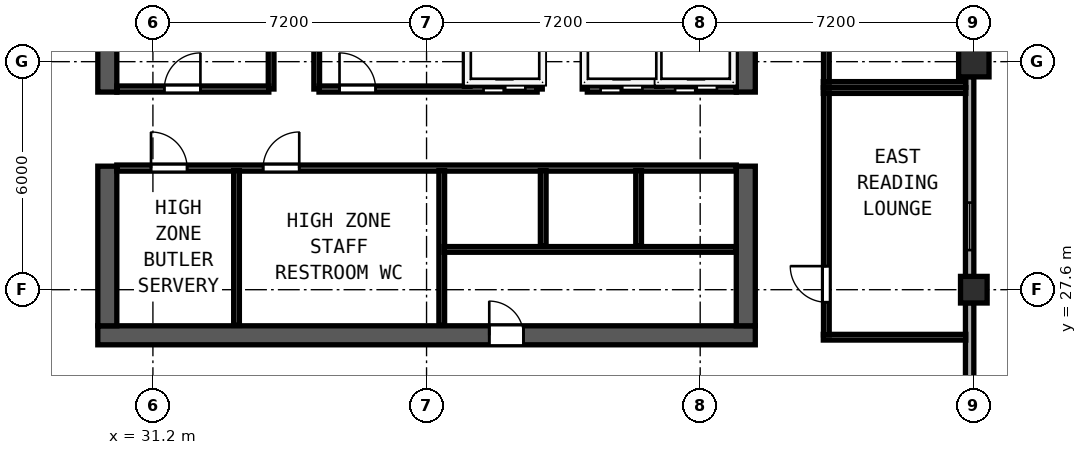
"""IFC4 building model, lengths in metres.
Left out: names, types, materials, properties, quantities, classifications, styles, units other than length and angle.
Written with IfcOpenShell. Run it as: python <this file> out.ifc"""

import sys

from ifc_helpers import new_model, si_unit, direction, frame, frame_2d, origin, origin_2d, place, context, subcontext, project, spatial, rectangle, hollow_rectangle, extrude, element, fill, save


model = new_model("IFC4")
c1 = context("Model", 3, precision=1e-05, world=origin(), true_north=direction((0.0, 1.0)))
c2 = subcontext(c1, "Body", "Model", "MODEL_VIEW")
j1 = project(units=[si_unit("LENGTHUNIT", "METRE"), si_unit("PLANEANGLEUNIT", "RADIAN")], contexts=[c1])
p1 = place(None, origin())
s1 = spatial("IfcSite", under=j1, at=p1, CompositionType="ELEMENT")
p2 = place(p1, origin())
s2 = spatial("IfcBuilding", under=s1, at=p2, CompositionType="ELEMENT")
p3 = place(p2, frame((0.0, 0.0, 246.75)))
s3 = spatial("IfcBuildingStorey", under=s2, at=p3, CompositionType="ELEMENT", Elevation=246.75)
p4 = place(p3, frame((29.75, 26.4, 0.0), z_axis=(0.0, 0.0, 1.0), x_axis=(1.0, 0.0, 0.0)))
e1 = element("IfcWall", 1, at=p4, inside=s3, PredefinedType="SHEAR", context=c2, shape_type="SweptSolid", body=[
    extrude(rectangle(XDim=17.3, YDim=0.5, at=frame_2d((8.65, 0.0))), origin(), (0.0, 0.0, 1.0), 3.67),
])
p5 = place(p4, frame((11.2, 0.0, 0.0), z_axis=(0.0, 0.0, 1.0), x_axis=(-1.0, 0.0, 0.0)))
e2 = element("IfcOpeningElement", 2, at=p5, cuts=e1, PredefinedType="OPENING", context=c2, shape_type="SweptSolid", body=[
    extrude(rectangle(XDim=0.9, YDim=2.1, at=frame_2d((0.45, 1.05))), frame((0.0, 0.26, 0.0), z_axis=(0.0, -1.0, 0.0), x_axis=(1.0, 0.0, 0.0)), (0.0, 0.0, 1.0), 0.52),
])
p6 = place(p3, frame((30.0, 26.65, 0.0), z_axis=(0.0, 0.0, 1.0), x_axis=(0.0, 1.0, 0.0)))
e3 = element("IfcWall", 3, at=p6, inside=s3, PredefinedType="SHEAR", context=c2, shape_type="SweptSolid", body=[
    extrude(rectangle(XDim=4.2, YDim=0.5, at=frame_2d((2.1, 0.0))), origin(), (0.0, 0.0, 1.0), 3.67),
])
p7 = place(p3, frame((30.0, 32.8, 0.0), z_axis=(0.0, 0.0, 1.0), x_axis=(0.0, 1.0, 0.0)))
e4 = element("IfcWall", 4, at=p7, inside=s3, PredefinedType="SHEAR", context=c2, shape_type="SweptSolid", body=[
    extrude(rectangle(XDim=10.15, YDim=0.5, at=frame_2d((5.075, 0.0))), origin(), (0.0, 0.0, 1.0), 3.67),
])
p8 = place(p3, frame((46.8, 26.65, 0.0), z_axis=(0.0, 0.0, 1.0), x_axis=(0.0, 1.0, 0.0)))
e5 = element("IfcWall", 5, at=p8, inside=s3, PredefinedType="SHEAR", context=c2, shape_type="SweptSolid", body=[
    extrude(rectangle(XDim=4.2, YDim=0.5, at=frame_2d((2.1, 0.0))), origin(), (0.0, 0.0, 1.0), 3.67),
])
p9 = place(p3, frame((46.8, 32.8, 0.0), z_axis=(0.0, 0.0, 1.0), x_axis=(0.0, 1.0, 0.0)))
e6 = element("IfcWall", 6, at=p9, inside=s3, PredefinedType="SHEAR", context=c2, shape_type="SweptSolid", body=[
    extrude(rectangle(XDim=10.15, YDim=0.5, at=frame_2d((5.075, 0.0))), origin(), (0.0, 0.0, 1.0), 3.67),
])
p10 = place(p3, frame((52.8, 33.6, 0.0), z_axis=(0.0, 0.0, 1.0), x_axis=(1.0, 0.0, 0.0)))
e7 = element("IfcColumn", 7, at=p10, inside=s3, PredefinedType="COLUMN", context=c2, shape_type="SweptSolid", body=[
    extrude(hollow_rectangle(XDim=0.8, YDim=0.8, WallThickness=0.03, at=origin_2d()), origin(), (0.0, 0.0, 1.0), 3.85),
])
p11 = place(p3, frame((52.8, 27.6, 0.0), z_axis=(0.0, 0.0, 1.0), x_axis=(1.0, 0.0, 0.0)))
e8 = element("IfcColumn", 8, at=p11, inside=s3, PredefinedType="COLUMN", context=c2, shape_type="SweptSolid", body=[
    extrude(hollow_rectangle(XDim=0.7, YDim=0.7, WallThickness=0.026, at=origin_2d()), origin(), (0.0, 0.0, 1.0), 3.85),
])
p12 = place(p3, frame((52.69, 21.992, 0.0), z_axis=(0.0, 0.0, 1.0), x_axis=(0.0, 1.0, 0.0)))
e9 = element("IfcWall", 9, at=p12, inside=s3, PredefinedType="SOLIDWALL", context=c2, shape_type="SweptSolid", body=[
    extrude(rectangle(XDim=5.266, YDim=0.22, at=frame_2d((2.633, 0.0))), origin(), (0.0, 0.0, 1.0), 3.315),
])
p13 = place(p12, frame((0.7, 0.0, 0.85)))
e10 = element("IfcOpeningElement", 10, at=p13, cuts=e9, PredefinedType="OPENING", context=c2, shape_type="SweptSolid", body=[
    extrude(rectangle(XDim=1.25, YDim=1.95, at=frame_2d((0.625, 0.975))), frame((0.0, 0.12, 0.0), z_axis=(0.0, -1.0, 0.0), x_axis=(1.0, 0.0, 0.0)), (0.0, 0.0, 1.0), 0.24),
])
p14 = place(p3, frame((52.69, 27.942, 0.0), z_axis=(0.0, 0.0, 1.0), x_axis=(0.0, 1.0, 0.0)))
e11 = element("IfcWall", 11, at=p14, inside=s3, PredefinedType="SOLIDWALL", context=c2, shape_type="SweptSolid", body=[
    extrude(rectangle(XDim=5.266, YDim=0.22, at=frame_2d((2.633, 0.0))), origin(), (0.0, 0.0, 1.0), 3.315),
])
p15 = place(p14, frame((0.7, 0.0, 0.85)))
e12 = element("IfcOpeningElement", 12, at=p15, cuts=e11, PredefinedType="OPENING", context=c2, shape_type="SweptSolid", body=[
    extrude(rectangle(XDim=1.25, YDim=1.95, at=frame_2d((0.625, 0.975))), frame((0.0, 0.12, 0.0), z_axis=(0.0, -1.0, 0.0), x_axis=(1.0, 0.0, 0.0)), (0.0, 0.0, 1.0), 0.24),
])
for number, where, z_axis, x_axis in (
    (13, (34.31, 32.88, 0.0), (0.0, 0.0, 1.0), (0.0, 1.0, 0.0)),
    (14, (35.51, 32.88, 0.0), (0.0, 0.0, 1.0), (0.0, 1.0, 0.0)),
    (15, (41.37, 32.88, 0.0), (0.0, 0.0, 1.0), (0.0, 1.0, 0.0)),
    (16, (42.57, 32.88, 0.0), (0.0, 0.0, 1.0), (0.0, 1.0, 0.0)),
):
    element("IfcWall", number, at=place(p3, frame(where, z_axis=z_axis, x_axis=x_axis)), inside=s3, PredefinedType="SOLIDWALL", context=c2, shape_type="SweptSolid", body=[
        extrude(rectangle(XDim=2.17, YDim=0.15, at=frame_2d((1.085, 0.0))), origin(), (0.0, 0.0, 1.0), 3.67),
    ])
p16 = place(p3, frame((30.25, 32.88, 0.0), z_axis=(0.0, 0.0, 1.0), x_axis=(1.0, 0.0, 0.0)))
e17 = element("IfcWall", 17, at=p16, inside=s3, PredefinedType="SOLIDWALL", context=c2, shape_type="SweptSolid", body=[
    extrude(rectangle(XDim=4.0, YDim=0.16, at=frame_2d((2.0, 0.0))), origin(), (0.0, 0.0, 1.0), 3.67),
])
p17 = place(p16, frame((2.2, 0.0, 0.0), z_axis=(0.0, 0.0, 1.0), x_axis=(-1.0, 0.0, 0.0)))
e18 = element("IfcOpeningElement", 18, at=p17, cuts=e17, PredefinedType="OPENING", context=c2, shape_type="SweptSolid", body=[
    extrude(rectangle(XDim=0.95, YDim=2.12, at=frame_2d((0.475, 1.06))), frame((0.0, 0.09, 0.0), z_axis=(0.0, -1.0, 0.0), x_axis=(1.0, 0.0, 0.0)), (0.0, 0.0, 1.0), 0.18),
])
p18 = place(p3, frame((35.57, 32.88, 0.0), z_axis=(0.0, 0.0, 1.0), x_axis=(1.0, 0.0, 0.0)))
e19 = element("IfcWall", 19, at=p18, inside=s3, PredefinedType="SOLIDWALL", context=c2, shape_type="SweptSolid", body=[
    extrude(rectangle(XDim=5.74, YDim=0.16, at=frame_2d((2.87, 0.0))), origin(), (0.0, 0.0, 1.0), 3.67),
])
p19 = place(p18, frame((1.49, 0.0, 0.0), z_axis=(0.0, 0.0, 1.0), x_axis=(-1.0, 0.0, 0.0)))
e20 = element("IfcOpeningElement", 20, at=p19, cuts=e19, PredefinedType="OPENING", context=c2, shape_type="SweptSolid", body=[
    extrude(rectangle(XDim=0.95, YDim=2.12, at=frame_2d((0.475, 1.06))), frame((0.0, 0.09, 0.0), z_axis=(0.0, -1.0, 0.0), x_axis=(1.0, 0.0, 0.0)), (0.0, 0.0, 1.0), 0.18),
])
p20 = place(p18, frame((5.43, 0.0, 0.0), z_axis=(0.0, 0.0, 1.0), x_axis=(-1.0, 0.0, 0.0)))
e21 = element("IfcOpeningElement", 21, at=p20, cuts=e19, PredefinedType="OPENING", context=c2, shape_type="SweptSolid", body=[
    extrude(rectangle(XDim=1.1, YDim=2.2, at=frame_2d((0.55, 1.1))), frame((0.0, 0.09, 0.0), z_axis=(0.0, -1.0, 0.0), x_axis=(1.0, 0.0, 0.0)), (0.0, 0.0, 1.0), 0.18),
])
p21 = place(p3, frame((42.63, 32.88, 0.0), z_axis=(0.0, 0.0, 1.0), x_axis=(1.0, 0.0, 0.0)))
e22 = element("IfcWall", 22, at=p21, inside=s3, PredefinedType="SOLIDWALL", context=c2, shape_type="SweptSolid", body=[
    extrude(rectangle(XDim=3.92, YDim=0.16, at=frame_2d((1.96, 0.0))), origin(), (0.0, 0.0, 1.0), 3.67),
])
p22 = place(p21, frame((1.45, 0.0, 0.0), z_axis=(0.0, 0.0, 1.0), x_axis=(-1.0, 0.0, 0.0)))
e23 = element("IfcOpeningElement", 23, at=p22, cuts=e22, PredefinedType="OPENING", context=c2, shape_type="SweptSolid", body=[
    extrude(rectangle(XDim=1.1, YDim=2.2, at=frame_2d((0.55, 1.1))), frame((0.0, 0.09, 0.0), z_axis=(0.0, -1.0, 0.0), x_axis=(1.0, 0.0, 0.0)), (0.0, 0.0, 1.0), 0.18),
])
p23 = place(p21, frame((3.41, 0.0, 0.0), z_axis=(0.0, 0.0, 1.0), x_axis=(-1.0, 0.0, 0.0)))
e24 = element("IfcOpeningElement", 24, at=p23, cuts=e22, PredefinedType="OPENING", context=c2, shape_type="SweptSolid", body=[
    extrude(rectangle(XDim=1.1, YDim=2.2, at=frame_2d((0.55, 1.1))), frame((0.0, 0.09, 0.0), z_axis=(0.0, -1.0, 0.0), x_axis=(1.0, 0.0, 0.0)), (0.0, 0.0, 1.0), 0.18),
])
for number, where, z_axis, x_axis in (
    (25, (39.47, 32.95, 0.0), (0.0, 0.0, 1.0), (0.0, 1.0, 0.0)),
    (26, (44.53, 32.95, 0.0), (0.0, 0.0, 1.0), (0.0, 1.0, 0.0)),
):
    element("IfcWall", number, at=place(p3, frame(where, z_axis=z_axis, x_axis=x_axis)), inside=s3, PredefinedType="SOLIDWALL", context=c2, shape_type="SweptSolid", body=[
        extrude(rectangle(XDim=2.05, YDim=0.15, at=frame_2d((1.025, 0.0))), origin(), (0.0, 0.0, 1.0), 3.67),
    ])
p24 = place(p3, frame((30.25, 30.8, 0.0), z_axis=(0.0, 0.0, 1.0), x_axis=(1.0, 0.0, 0.0)))
e27 = element("IfcWall", 27, at=p24, inside=s3, PredefinedType="SOLIDWALL", context=c2, shape_type="SweptSolid", body=[
    extrude(rectangle(XDim=16.3, YDim=0.16, at=frame_2d((8.15, 0.0))), origin(), (0.0, 0.0, 1.0), 3.67),
])
p25 = place(p24, frame((0.9, 0.0, 0.0)))
e28 = element("IfcOpeningElement", 28, at=p25, cuts=e27, PredefinedType="OPENING", context=c2, shape_type="SweptSolid", body=[
    extrude(rectangle(XDim=0.95, YDim=2.12, at=frame_2d((0.475, 1.06))), frame((0.0, 0.09, 0.0), z_axis=(0.0, -1.0, 0.0), x_axis=(1.0, 0.0, 0.0)), (0.0, 0.0, 1.0), 0.18),
])
p26 = place(p24, frame((3.85, 0.0, 0.0)))
e29 = element("IfcOpeningElement", 29, at=p26, cuts=e27, PredefinedType="OPENING", context=c2, shape_type="SweptSolid", body=[
    extrude(rectangle(XDim=0.95, YDim=2.12, at=frame_2d((0.475, 1.06))), frame((0.0, 0.09, 0.0), z_axis=(0.0, -1.0, 0.0), x_axis=(1.0, 0.0, 0.0)), (0.0, 0.0, 1.0), 0.18),
])
p27 = place(p3, frame((38.8, 26.66, 0.0), z_axis=(0.0, 0.0, 1.0), x_axis=(0.0, 1.0, 0.0)))
e30 = element("IfcWall", 30, at=p27, inside=s3, PredefinedType="SOLIDWALL", context=c2, shape_type="SweptSolid", body=[
    extrude(rectangle(XDim=4.075, YDim=0.15, at=frame_2d((2.038, 0.0))), origin(), (0.0, 0.0, 1.0), 3.67),
])
p28 = place(p3, frame((33.4, 26.66, 0.0), z_axis=(0.0, 0.0, 1.0), x_axis=(0.0, 1.0, 0.0)))
e31 = element("IfcWall", 31, at=p28, inside=s3, PredefinedType="PARTITIONING", context=c2, shape_type="SweptSolid", body=[
    extrude(rectangle(XDim=4.075, YDim=0.15, at=frame_2d((2.038, 0.0))), origin(), (0.0, 0.0, 1.0), 3.67),
])
p29 = place(p3, frame((38.86, 28.66, 0.0), z_axis=(0.0, 0.0, 1.0), x_axis=(1.0, 0.0, 0.0)))
e32 = element("IfcWall", 32, at=p29, inside=s3, PredefinedType="PARTITIONING", context=c2, shape_type="SweptSolid", body=[
    extrude(rectangle(XDim=7.69, YDim=0.15, at=frame_2d((3.845, 0.0))), origin(), (0.0, 0.0, 1.0), 3.67),
])
for number, where, z_axis, x_axis in (
    (33, (41.47, 28.75, 0.0), (0.0, 0.0, 1.0), (0.0, 1.0, 0.0)),
    (34, (43.98, 28.75, 0.0), (0.0, 0.0, 1.0), (0.0, 1.0, 0.0)),
):
    element("IfcWall", number, at=place(p3, frame(where, z_axis=z_axis, x_axis=x_axis)), inside=s3, PredefinedType="SOLIDWALL", context=c2, shape_type="SweptSolid", body=[
        extrude(rectangle(XDim=1.985, YDim=0.15, at=frame_2d((0.993, 0.0))), origin(), (0.0, 0.0, 1.0), 3.67),
    ])
p30 = place(p3, frame((48.84, 33.0, 0.0), z_axis=(0.0, 0.0, 1.0), x_axis=(1.0, 0.0, 0.0)))
e35 = element("IfcWall", 35, at=p30, inside=s3, PredefinedType="PARTITIONING", context=c2, shape_type="SweptSolid", body=[
    extrude(rectangle(XDim=3.748, YDim=0.15, at=frame_2d((1.874, 0.0))), origin(), (0.0, 0.0, 1.0), 3.67),
])
p31 = place(p3, frame((48.92, 33.06, 0.0), z_axis=(0.0, 0.0, 1.0), x_axis=(0.0, 1.0, 0.0)))
e36 = element("IfcWall", 36, at=p31, inside=s3, PredefinedType="PARTITIONING", context=c2, shape_type="SweptSolid", body=[
    extrude(rectangle(XDim=6.08, YDim=0.15, at=frame_2d((3.04, 0.0))), origin(), (0.0, 0.0, 1.0), 3.67),
])
p32 = place(p31, frame((1.66, 0.0, 0.0)))
e37 = element("IfcOpeningElement", 37, at=p32, cuts=e36, PredefinedType="OPENING", context=c2, shape_type="SweptSolid", body=[
    extrude(rectangle(XDim=0.95, YDim=2.12, at=frame_2d((0.475, 1.06))), frame((0.0, 0.085, 0.0), z_axis=(0.0, -1.0, 0.0), x_axis=(1.0, 0.0, 0.0)), (0.0, 0.0, 1.0), 0.17),
])
for number, where, z_axis, x_axis in (
    (38, (48.84, 32.84, 0.0), (0.0, 0.0, 1.0), (1.0, 0.0, 0.0)),
    (39, (48.84, 26.35, 0.0), (0.0, 0.0, 1.0), (1.0, 0.0, 0.0)),
):
    element("IfcWall", number, at=place(p3, frame(where, z_axis=z_axis, x_axis=x_axis)), inside=s3, PredefinedType="PARTITIONING", context=c2, shape_type="SweptSolid", body=[
        extrude(rectangle(XDim=3.748, YDim=0.15, at=frame_2d((1.874, 0.0))), origin(), (0.0, 0.0, 1.0), 3.67),
    ])
p33 = place(p3, frame((48.92, 26.41, 0.0), z_axis=(0.0, 0.0, 1.0), x_axis=(0.0, 1.0, 0.0)))
e40 = element("IfcWall", 40, at=p33, inside=s3, PredefinedType="PARTITIONING", context=c2, shape_type="SweptSolid", body=[
    extrude(rectangle(XDim=6.37, YDim=0.15, at=frame_2d((3.185, 0.0))), origin(), (0.0, 0.0, 1.0), 3.67),
])
p34 = place(p33, frame((0.86, 0.0, 0.0)))
e41 = element("IfcOpeningElement", 41, at=p34, cuts=e40, PredefinedType="OPENING", context=c2, shape_type="SweptSolid", body=[
    extrude(rectangle(XDim=0.95, YDim=2.12, at=frame_2d((0.475, 1.06))), frame((0.0, 0.085, 0.0), z_axis=(0.0, -1.0, 0.0), x_axis=(1.0, 0.0, 0.0)), (0.0, 0.0, 1.0), 0.17),
])
p35 = place(p15, origin())
e42 = element("IfcWindow", 42, at=p35, inside=s3, PartitioningType="SINGLE_PANEL", PredefinedType="WINDOW", context=c2, shape_type="SweptSolid", body=[
    extrude(rectangle(XDim=1.25, YDim=1.95, at=frame_2d((0.625, 0.975))), frame((0.0, 0.03, 0.0), z_axis=(0.0, -1.0, 0.0), x_axis=(1.0, 0.0, 0.0)), (0.0, 0.0, 1.0), 0.06),
])
fill(e12, e42)
p36 = place(p17, origin())
e43 = element("IfcDoor", 43, at=p36, inside=s3, OperationType="SINGLE_SWING_LEFT", PredefinedType="DOOR", context=c2, shape_type="SweptSolid", body=[
    extrude(rectangle(XDim=0.95, YDim=2.12, at=frame_2d((0.475, 1.06))), frame((0.0, 0.025, 0.0), z_axis=(0.0, -1.0, 0.0), x_axis=(1.0, 0.0, 0.0)), (0.0, 0.0, 1.0), 0.05),
])
fill(e18, e43)
p37 = place(p19, origin())
e44 = element("IfcDoor", 44, at=p37, inside=s3, OperationType="SINGLE_SWING_RIGHT", PredefinedType="DOOR", context=c2, shape_type="SweptSolid", body=[
    extrude(rectangle(XDim=0.95, YDim=2.12, at=frame_2d((0.475, 1.06))), frame((0.0, 0.025, 0.0), z_axis=(0.0, -1.0, 0.0), x_axis=(1.0, 0.0, 0.0)), (0.0, 0.0, 1.0), 0.05),
])
fill(e20, e44)
p38 = place(p20, origin())
e45 = element("IfcDoor", 45, at=p38, inside=s3, OperationType="SLIDING_TO_RIGHT", PredefinedType="DOOR", context=c2, shape_type="SweptSolid", body=[
    extrude(rectangle(XDim=1.1, YDim=2.2, at=frame_2d((0.55, 1.1))), frame((0.0, 0.025, 0.0), z_axis=(0.0, -1.0, 0.0), x_axis=(1.0, 0.0, 0.0)), (0.0, 0.0, 1.0), 0.05),
])
fill(e21, e45)
p39 = place(p22, origin())
e46 = element("IfcDoor", 46, at=p39, inside=s3, OperationType="SLIDING_TO_RIGHT", PredefinedType="DOOR", context=c2, shape_type="SweptSolid", body=[
    extrude(rectangle(XDim=1.1, YDim=2.2, at=frame_2d((0.55, 1.1))), frame((0.0, 0.025, 0.0), z_axis=(0.0, -1.0, 0.0), x_axis=(1.0, 0.0, 0.0)), (0.0, 0.0, 1.0), 0.05),
])
fill(e23, e46)
p40 = place(p23, origin())
e47 = element("IfcDoor", 47, at=p40, inside=s3, OperationType="SLIDING_TO_RIGHT", PredefinedType="DOOR", context=c2, shape_type="SweptSolid", body=[
    extrude(rectangle(XDim=1.1, YDim=2.2, at=frame_2d((0.55, 1.1))), frame((0.0, 0.025, 0.0), z_axis=(0.0, -1.0, 0.0), x_axis=(1.0, 0.0, 0.0)), (0.0, 0.0, 1.0), 0.05),
])
fill(e24, e47)
p41 = place(p25, origin())
e48 = element("IfcDoor", 48, at=p41, inside=s3, OperationType="SINGLE_SWING_LEFT", PredefinedType="DOOR", context=c2, shape_type="SweptSolid", body=[
    extrude(rectangle(XDim=0.95, YDim=2.12, at=frame_2d((0.475, 1.06))), frame((0.0, 0.025, 0.0), z_axis=(0.0, -1.0, 0.0), x_axis=(1.0, 0.0, 0.0)), (0.0, 0.0, 1.0), 0.05),
])
fill(e28, e48)
p42 = place(p26, origin())
e49 = element("IfcDoor", 49, at=p42, inside=s3, OperationType="SINGLE_SWING_RIGHT", PredefinedType="DOOR", context=c2, shape_type="SweptSolid", body=[
    extrude(rectangle(XDim=0.95, YDim=2.12, at=frame_2d((0.475, 1.06))), frame((0.0, 0.025, 0.0), z_axis=(0.0, -1.0, 0.0), x_axis=(1.0, 0.0, 0.0)), (0.0, 0.0, 1.0), 0.05),
])
fill(e29, e49)
p43 = place(p5, origin())
e50 = element("IfcDoor", 50, at=p43, inside=s3, OperationType="SINGLE_SWING_RIGHT", PredefinedType="DOOR", context=c2, shape_type="SweptSolid", body=[
    extrude(rectangle(XDim=0.9, YDim=2.1, at=frame_2d((0.45, 1.05))), frame((0.0, -0.195, 0.0), z_axis=(0.0, -1.0, 0.0), x_axis=(1.0, 0.0, 0.0)), (0.0, 0.0, 1.0), 0.05),
])
fill(e2, e50)
p44 = place(p34, origin())
e51 = element("IfcDoor", 51, at=p44, inside=s3, OperationType="SINGLE_SWING_RIGHT", PredefinedType="DOOR", context=c2, shape_type="SweptSolid", body=[
    extrude(rectangle(XDim=0.95, YDim=2.12, at=frame_2d((0.475, 1.06))), frame((0.0, 0.025, 0.0), z_axis=(0.0, -1.0, 0.0), x_axis=(1.0, 0.0, 0.0)), (0.0, 0.0, 1.0), 0.05),
])
fill(e41, e51)
save(model, sys.argv[1])
